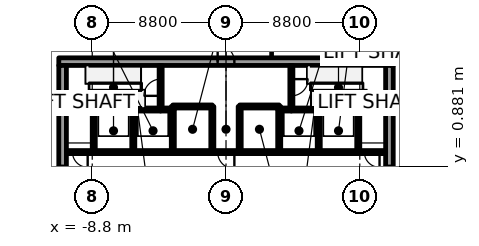
"""IFC4 building model, lengths in metres.
Left out: names, types, materials, properties, quantities, classifications, styles, units other than length and angle.
Written with IfcOpenShell. Run it as: python <this file> out.ifc"""

import sys

from ifc_helpers import new_model, si_unit, direction, frame, frame_2d, origin, place, context, subcontext, project, spatial, rectangle, extrude, element, fill, save


model = new_model("IFC4")
c1 = context("Model", 3, precision=1e-05, world=origin(), true_north=direction((0.0, 1.0)))
c2 = subcontext(c1, "Body", "Model", "MODEL_VIEW")
j1 = project(units=[si_unit("LENGTHUNIT", "METRE"), si_unit("PLANEANGLEUNIT", "RADIAN")], contexts=[c1])
p1 = place(None, origin())
s1 = spatial("IfcSite", under=j1, at=p1, CompositionType="ELEMENT")
p2 = place(p1, origin())
s2 = spatial("IfcBuilding", under=s1, at=p2, CompositionType="ELEMENT")
p3 = place(p2, origin())
s3 = spatial("IfcBuildingStorey", under=s2, at=p3, CompositionType="ELEMENT", Elevation=0.0)
p4 = place(p3, frame((-11.0, 7.75, 0.0), z_axis=(0.0, 0.0, 1.0), x_axis=(1.0, 0.0, 0.0)))
e1 = element("IfcWall", 1, at=p4, inside=s3, PredefinedType="SHEAR", context=c2, shape_type="SweptSolid", body=[
    extrude(rectangle(XDim=22.0, YDim=0.5, at=frame_2d((11.0, 0.0))), origin(), (0.0, 0.0, 1.0), 9.0),
])
p5 = place(p4, frame((10.45, 0.0, 0.0)))
e2 = element("IfcOpeningElement", 2, at=p5, cuts=e1, PredefinedType="OPENING", context=c2, shape_type="SweptSolid", body=[
    extrude(rectangle(XDim=1.1, YDim=2.1, at=frame_2d((0.55, 1.05))), frame((0.0, 0.25, 0.0), z_axis=(0.0, -1.0, 0.0), x_axis=(1.0, 0.0, 0.0)), (0.0, 0.0, 1.0), 0.5),
])
p6 = place(p3, frame((-10.75, -7.5, 0.0), z_axis=(0.0, 0.0, 1.0), x_axis=(0.0, 1.0, 0.0)))
e3 = element("IfcWall", 3, at=p6, inside=s3, PredefinedType="SHEAR", context=c2, shape_type="SweptSolid", body=[
    extrude(rectangle(XDim=15.0, YDim=0.5, at=frame_2d((7.5, 0.0))), origin(), (0.0, 0.0, 1.0), 9.0),
])
p7 = place(p6, frame((6.6, 0.0, 0.0)))
e4 = element("IfcOpeningElement", 4, at=p7, cuts=e3, PredefinedType="OPENING", context=c2, shape_type="SweptSolid", body=[
    extrude(rectangle(XDim=1.8, YDim=2.1, at=frame_2d((0.9, 1.05))), frame((0.0, 0.25, 0.0), z_axis=(0.0, -1.0, 0.0), x_axis=(1.0, 0.0, 0.0)), (0.0, 0.0, 1.0), 0.5),
])
p8 = place(p3, frame((10.75, -7.5, 0.0), z_axis=(0.0, 0.0, 1.0), x_axis=(0.0, 1.0, 0.0)))
e5 = element("IfcWall", 5, at=p8, inside=s3, PredefinedType="SHEAR", context=c2, shape_type="SweptSolid", body=[
    extrude(rectangle(XDim=15.0, YDim=0.5, at=frame_2d((7.5, 0.0))), origin(), (0.0, 0.0, 1.0), 9.0),
])
p9 = place(p8, frame((6.6, 0.0, 0.0)))
e6 = element("IfcOpeningElement", 6, at=p9, cuts=e5, PredefinedType="OPENING", context=c2, shape_type="SweptSolid", body=[
    extrude(rectangle(XDim=1.8, YDim=2.1, at=frame_2d((0.9, 1.05))), frame((0.0, 0.25, 0.0), z_axis=(0.0, -1.0, 0.0), x_axis=(1.0, 0.0, 0.0)), (0.0, 0.0, 1.0), 0.5),
])
p10 = place(p3, frame((-8.7, 1.8, 0.0), z_axis=(0.0, 0.0, 1.0), x_axis=(-1.0, 0.0, 0.0)))
e7 = element("IfcWall", 7, at=p10, inside=s3, PredefinedType="SOLIDWALL", context=c2, shape_type="SweptSolid", body=[
    extrude(rectangle(XDim=1.8, YDim=0.2, at=frame_2d((0.9, 0.0))), origin(), (0.0, 0.0, 1.0), 8.75),
])
p11 = place(p10, frame((0.4, 0.0, 0.0)))
e8 = element("IfcOpeningElement", 8, at=p11, cuts=e7, PredefinedType="OPENING", context=c2, shape_type="SweptSolid", body=[
    extrude(rectangle(XDim=1.0, YDim=2.4, at=frame_2d((0.5, 1.2))), frame((0.0, 0.1, 0.0), z_axis=(0.0, -1.0, 0.0), x_axis=(1.0, 0.0, 0.0)), (0.0, 0.0, 1.0), 0.2),
])
p12 = place(p3, frame((-8.7, 4.6, 0.0), z_axis=(0.0, 0.0, 1.0), x_axis=(-1.0, 0.0, 0.0)))
e9 = element("IfcWall", 9, at=p12, inside=s3, PredefinedType="SOLIDWALL", context=c2, shape_type="SweptSolid", body=[
    extrude(rectangle(XDim=1.8, YDim=0.2, at=frame_2d((0.9, 0.0))), origin(), (0.0, 0.0, 1.0), 8.75),
])
p13 = place(p3, frame((-6.1, 1.8, 0.0), z_axis=(0.0, 0.0, 1.0), x_axis=(-1.0, 0.0, 0.0)))
e10 = element("IfcWall", 10, at=p13, inside=s3, PredefinedType="SOLIDWALL", context=c2, shape_type="SweptSolid", body=[
    extrude(rectangle(XDim=2.6, YDim=0.2, at=frame_2d((1.3, 0.0))), origin(), (0.0, 0.0, 1.0), 8.75),
])
p14 = place(p13, frame((0.75, 0.0, 0.0)))
e11 = element("IfcOpeningElement", 11, at=p14, cuts=e10, PredefinedType="OPENING", context=c2, shape_type="SweptSolid", body=[
    extrude(rectangle(XDim=1.1, YDim=2.1, at=frame_2d((0.55, 1.05))), frame((0.0, 0.1, 0.0), z_axis=(0.0, -1.0, 0.0), x_axis=(1.0, 0.0, 0.0)), (0.0, 0.0, 1.0), 0.2),
])
p15 = place(p3, frame((-8.7, 1.8, 0.0), z_axis=(0.0, 0.0, 1.0), x_axis=(0.0, 1.0, 0.0)))
e12 = element("IfcWall", 12, at=p15, inside=s3, PredefinedType="SOLIDWALL", context=c2, shape_type="SweptSolid", body=[
    extrude(rectangle(XDim=2.8, YDim=0.2, at=frame_2d((1.4, 0.0))), origin(), (0.0, 0.0, 1.0), 8.75),
])
p16 = place(p3, frame((-6.1, 4.6, 0.0), z_axis=(0.0, 0.0, 1.0), x_axis=(-1.0, 0.0, 0.0)))
e13 = element("IfcWall", 13, at=p16, inside=s3, PredefinedType="SOLIDWALL", context=c2, shape_type="SweptSolid", body=[
    extrude(rectangle(XDim=2.6, YDim=0.2, at=frame_2d((1.3, 0.0))), origin(), (0.0, 0.0, 1.0), 8.75),
])
p17 = place(p3, frame((-3.5, 1.8, 0.0), z_axis=(0.0, 0.0, 1.0), x_axis=(-1.0, 0.0, 0.0)))
e14 = element("IfcWall", 14, at=p17, inside=s3, PredefinedType="SOLIDWALL", context=c2, shape_type="SweptSolid", body=[
    extrude(rectangle(XDim=2.6, YDim=0.2, at=frame_2d((1.3, 0.0))), origin(), (0.0, 0.0, 1.0), 8.75),
])
p18 = place(p17, frame((0.75, 0.0, 0.0)))
e15 = element("IfcOpeningElement", 15, at=p18, cuts=e14, PredefinedType="OPENING", context=c2, shape_type="SweptSolid", body=[
    extrude(rectangle(XDim=1.1, YDim=2.1, at=frame_2d((0.55, 1.05))), frame((0.0, 0.1, 0.0), z_axis=(0.0, -1.0, 0.0), x_axis=(1.0, 0.0, 0.0)), (0.0, 0.0, 1.0), 0.2),
])
p19 = place(p3, frame((-6.1, 1.8, 0.0), z_axis=(0.0, 0.0, 1.0), x_axis=(0.0, 1.0, 0.0)))
e16 = element("IfcWall", 16, at=p19, inside=s3, PredefinedType="SOLIDWALL", context=c2, shape_type="SweptSolid", body=[
    extrude(rectangle(XDim=2.8, YDim=0.2, at=frame_2d((1.4, 0.0))), origin(), (0.0, 0.0, 1.0), 8.75),
])
p20 = place(p3, frame((-4.3, 4.6, 0.0), z_axis=(0.0, 0.0, 1.0), x_axis=(-1.0, 0.0, 0.0)))
e17 = element("IfcWall", 17, at=p20, inside=s3, PredefinedType="SOLIDWALL", context=c2, shape_type="SweptSolid", body=[
    extrude(rectangle(XDim=1.8, YDim=0.2, at=frame_2d((0.9, 0.0))), origin(), (0.0, 0.0, 1.0), 8.75),
])
p21 = place(p3, frame((-3.5, 4.6, 0.0), z_axis=(0.0, 0.0, 1.0), x_axis=(-1.0, 0.0, 0.0)))
e18 = element("IfcWall", 18, at=p21, inside=s3, PredefinedType="SOLIDWALL", context=c2, shape_type="SweptSolid", body=[
    extrude(rectangle(XDim=0.8, YDim=0.2, at=frame_2d((0.4, 0.0))), origin(), (0.0, 0.0, 1.0), 8.75),
])
p22 = place(p3, frame((-4.3, 4.6, 0.0), z_axis=(0.0, 0.0, 1.0), x_axis=(0.0, 1.0, 0.0)))
e19 = element("IfcWall", 19, at=p22, inside=s3, PredefinedType="SOLIDWALL", context=c2, shape_type="SweptSolid", body=[
    extrude(rectangle(XDim=2.9, YDim=0.2, at=frame_2d((1.45, 0.0))), origin(), (0.0, 0.0, 1.0), 8.75),
])
p23 = place(p22, frame((0.9, 0.0, 0.0)))
e20 = element("IfcOpeningElement", 20, at=p23, cuts=e19, PredefinedType="OPENING", context=c2, shape_type="SweptSolid", body=[
    extrude(rectangle(XDim=1.1, YDim=2.4, at=frame_2d((0.55, 1.2))), frame((0.0, 0.1, 0.0), z_axis=(0.0, -1.0, 0.0), x_axis=(1.0, 0.0, 0.0)), (0.0, 0.0, 1.0), 0.2),
])
p24 = place(p3, frame((-0.9, 1.8, 0.0), z_axis=(0.0, 0.0, 1.0), x_axis=(-1.0, 0.0, 0.0)))
e21 = element("IfcWall", 21, at=p24, inside=s3, PredefinedType="SOLIDWALL", context=c2, shape_type="SweptSolid", body=[
    extrude(rectangle(XDim=2.6, YDim=0.2, at=frame_2d((1.3, 0.0))), origin(), (0.0, 0.0, 1.0), 8.75),
])
p25 = place(p3, frame((-3.5, 4.6, 0.0), z_axis=(0.0, 0.0, 1.0), x_axis=(0.0, -1.0, 0.0)))
e22 = element("IfcWall", 22, at=p25, inside=s3, PredefinedType="SOLIDWALL", context=c2, shape_type="SweptSolid", body=[
    extrude(rectangle(XDim=2.8, YDim=0.2, at=frame_2d((1.4, 0.0))), origin(), (0.0, 0.0, 1.0), 8.75),
])
p26 = place(p3, frame((-0.9, 1.8, 0.0), z_axis=(0.0, 0.0, 1.0), x_axis=(0.0, 1.0, 0.0)))
e23 = element("IfcWall", 23, at=p26, inside=s3, PredefinedType="SOLIDWALL", context=c2, shape_type="SweptSolid", body=[
    extrude(rectangle(XDim=3.0, YDim=0.2, at=frame_2d((1.5, 0.0))), origin(), (0.0, 0.0, 1.0), 8.75),
])
p27 = place(p26, frame((0.9, 0.0, 0.0)))
e24 = element("IfcOpeningElement", 24, at=p27, cuts=e23, PredefinedType="OPENING", context=c2, shape_type="SweptSolid", body=[
    extrude(rectangle(XDim=1.2, YDim=2.1, at=frame_2d((0.6, 1.05))), frame((0.0, 0.1, 0.0), z_axis=(0.0, -1.0, 0.0), x_axis=(1.0, 0.0, 0.0)), (0.0, 0.0, 1.0), 0.2),
])
p28 = place(p3, frame((-0.9, 4.8, 0.0), z_axis=(0.0, 0.0, 1.0), x_axis=(-1.0, 0.0, 0.0)))
e25 = element("IfcWall", 25, at=p28, inside=s3, PredefinedType="SOLIDWALL", context=c2, shape_type="SweptSolid", body=[
    extrude(rectangle(XDim=2.6, YDim=0.2, at=frame_2d((1.3, 0.0))), origin(), (0.0, 0.0, 1.0), 8.75),
])
p29 = place(p3, frame((-3.5, 4.8, 0.0), z_axis=(0.0, 0.0, 1.0), x_axis=(0.0, -1.0, 0.0)))
e26 = element("IfcWall", 26, at=p29, inside=s3, PredefinedType="SOLIDWALL", context=c2, shape_type="SweptSolid", body=[
    extrude(rectangle(XDim=0.2, YDim=0.2, at=frame_2d((0.1, 0.0))), origin(), (0.0, 0.0, 1.0), 8.75),
])
p30 = place(p3, frame((0.9, 1.8, 0.0), z_axis=(0.0, 0.0, 1.0), x_axis=(-1.0, 0.0, 0.0)))
e27 = element("IfcWall", 27, at=p30, inside=s3, PredefinedType="SOLIDWALL", context=c2, shape_type="SweptSolid", body=[
    extrude(rectangle(XDim=1.8, YDim=0.2, at=frame_2d((0.9, 0.0))), origin(), (0.0, 0.0, 1.0), 8.75),
])
p31 = place(p30, frame((0.35, 0.0, 0.0)))
e28 = element("IfcOpeningElement", 28, at=p31, cuts=e27, PredefinedType="OPENING", context=c2, shape_type="SweptSolid", body=[
    extrude(rectangle(XDim=1.1, YDim=2.4, at=frame_2d((0.55, 1.2))), frame((0.0, 0.1, 0.0), z_axis=(0.0, -1.0, 0.0), x_axis=(1.0, 0.0, 0.0)), (0.0, 0.0, 1.0), 0.2),
])
p32 = place(p3, frame((3.5, 1.8, 0.0), z_axis=(0.0, 0.0, 1.0), x_axis=(-1.0, 0.0, 0.0)))
e29 = element("IfcWall", 29, at=p32, inside=s3, PredefinedType="SOLIDWALL", context=c2, shape_type="SweptSolid", body=[
    extrude(rectangle(XDim=2.6, YDim=0.2, at=frame_2d((1.3, 0.0))), origin(), (0.0, 0.0, 1.0), 8.75),
])
p33 = place(p3, frame((3.5, 4.6, 0.0), z_axis=(0.0, 0.0, 1.0), x_axis=(0.0, 1.0, 0.0)))
e30 = element("IfcWall", 30, at=p33, inside=s3, PredefinedType="SOLIDWALL", context=c2, shape_type="SweptSolid", body=[
    extrude(rectangle(XDim=0.2, YDim=0.2, at=frame_2d((0.1, 0.0))), origin(), (0.0, 0.0, 1.0), 8.75),
])
p34 = place(p3, frame((3.5, 4.8, 0.0), z_axis=(0.0, 0.0, 1.0), x_axis=(-1.0, 0.0, 0.0)))
e31 = element("IfcWall", 31, at=p34, inside=s3, PredefinedType="SOLIDWALL", context=c2, shape_type="SweptSolid", body=[
    extrude(rectangle(XDim=2.6, YDim=0.2, at=frame_2d((1.3, 0.0))), origin(), (0.0, 0.0, 1.0), 8.75),
])
p35 = place(p3, frame((0.9, 4.8, 0.0), z_axis=(0.0, 0.0, 1.0), x_axis=(0.0, -1.0, 0.0)))
e32 = element("IfcWall", 32, at=p35, inside=s3, PredefinedType="SOLIDWALL", context=c2, shape_type="SweptSolid", body=[
    extrude(rectangle(XDim=3.0, YDim=0.2, at=frame_2d((1.5, 0.0))), origin(), (0.0, 0.0, 1.0), 8.75),
])
p36 = place(p35, frame((0.9, 0.0, 0.0)))
e33 = element("IfcOpeningElement", 33, at=p36, cuts=e32, PredefinedType="OPENING", context=c2, shape_type="SweptSolid", body=[
    extrude(rectangle(XDim=1.2, YDim=2.1, at=frame_2d((0.6, 1.05))), frame((0.0, 0.1, 0.0), z_axis=(0.0, -1.0, 0.0), x_axis=(1.0, 0.0, 0.0)), (0.0, 0.0, 1.0), 0.2),
])
p37 = place(p3, frame((6.1, 1.8, 0.0), z_axis=(0.0, 0.0, 1.0), x_axis=(-1.0, 0.0, 0.0)))
e34 = element("IfcWall", 34, at=p37, inside=s3, PredefinedType="SOLIDWALL", context=c2, shape_type="SweptSolid", body=[
    extrude(rectangle(XDim=2.6, YDim=0.2, at=frame_2d((1.3, 0.0))), origin(), (0.0, 0.0, 1.0), 8.75),
])
p38 = place(p37, frame((0.75, 0.0, 0.0)))
e35 = element("IfcOpeningElement", 35, at=p38, cuts=e34, PredefinedType="OPENING", context=c2, shape_type="SweptSolid", body=[
    extrude(rectangle(XDim=1.1, YDim=2.1, at=frame_2d((0.55, 1.05))), frame((0.0, 0.1, 0.0), z_axis=(0.0, -1.0, 0.0), x_axis=(1.0, 0.0, 0.0)), (0.0, 0.0, 1.0), 0.2),
])
p39 = place(p3, frame((3.5, 1.8, 0.0), z_axis=(0.0, 0.0, 1.0), x_axis=(0.0, 1.0, 0.0)))
e36 = element("IfcWall", 36, at=p39, inside=s3, PredefinedType="SOLIDWALL", context=c2, shape_type="SweptSolid", body=[
    extrude(rectangle(XDim=2.8, YDim=0.2, at=frame_2d((1.4, 0.0))), origin(), (0.0, 0.0, 1.0), 8.75),
])
p40 = place(p3, frame((4.3, 4.6, 0.0), z_axis=(0.0, 0.0, 1.0), x_axis=(-1.0, 0.0, 0.0)))
e37 = element("IfcWall", 37, at=p40, inside=s3, PredefinedType="SOLIDWALL", context=c2, shape_type="SweptSolid", body=[
    extrude(rectangle(XDim=0.8, YDim=0.2, at=frame_2d((0.4, 0.0))), origin(), (0.0, 0.0, 1.0), 8.75),
])
p41 = place(p3, frame((6.1, 4.6, 0.0), z_axis=(0.0, 0.0, 1.0), x_axis=(-1.0, 0.0, 0.0)))
e38 = element("IfcWall", 38, at=p41, inside=s3, PredefinedType="SOLIDWALL", context=c2, shape_type="SweptSolid", body=[
    extrude(rectangle(XDim=1.8, YDim=0.2, at=frame_2d((0.9, 0.0))), origin(), (0.0, 0.0, 1.0), 8.75),
])
p42 = place(p3, frame((4.3, 7.5, 0.0), z_axis=(0.0, 0.0, 1.0), x_axis=(0.0, -1.0, 0.0)))
e39 = element("IfcWall", 39, at=p42, inside=s3, PredefinedType="SOLIDWALL", context=c2, shape_type="SweptSolid", body=[
    extrude(rectangle(XDim=2.9, YDim=0.2, at=frame_2d((1.45, 0.0))), origin(), (0.0, 0.0, 1.0), 8.75),
])
p43 = place(p42, frame((0.9, 0.0, 0.0)))
e40 = element("IfcOpeningElement", 40, at=p43, cuts=e39, PredefinedType="OPENING", context=c2, shape_type="SweptSolid", body=[
    extrude(rectangle(XDim=1.1, YDim=2.4, at=frame_2d((0.55, 1.2))), frame((0.0, 0.1, 0.0), z_axis=(0.0, -1.0, 0.0), x_axis=(1.0, 0.0, 0.0)), (0.0, 0.0, 1.0), 0.2),
])
p44 = place(p3, frame((8.7, 1.8, 0.0), z_axis=(0.0, 0.0, 1.0), x_axis=(-1.0, 0.0, 0.0)))
e41 = element("IfcWall", 41, at=p44, inside=s3, PredefinedType="SOLIDWALL", context=c2, shape_type="SweptSolid", body=[
    extrude(rectangle(XDim=2.6, YDim=0.2, at=frame_2d((1.3, 0.0))), origin(), (0.0, 0.0, 1.0), 8.75),
])
p45 = place(p44, frame((0.75, 0.0, 0.0)))
e42 = element("IfcOpeningElement", 42, at=p45, cuts=e41, PredefinedType="OPENING", context=c2, shape_type="SweptSolid", body=[
    extrude(rectangle(XDim=1.1, YDim=2.1, at=frame_2d((0.55, 1.05))), frame((0.0, 0.1, 0.0), z_axis=(0.0, -1.0, 0.0), x_axis=(1.0, 0.0, 0.0)), (0.0, 0.0, 1.0), 0.2),
])
p46 = place(p3, frame((6.1, 1.8, 0.0), z_axis=(0.0, 0.0, 1.0), x_axis=(0.0, 1.0, 0.0)))
e43 = element("IfcWall", 43, at=p46, inside=s3, PredefinedType="SOLIDWALL", context=c2, shape_type="SweptSolid", body=[
    extrude(rectangle(XDim=2.8, YDim=0.2, at=frame_2d((1.4, 0.0))), origin(), (0.0, 0.0, 1.0), 8.75),
])
p47 = place(p3, frame((8.7, 4.6, 0.0), z_axis=(0.0, 0.0, 1.0), x_axis=(-1.0, 0.0, 0.0)))
e44 = element("IfcWall", 44, at=p47, inside=s3, PredefinedType="SOLIDWALL", context=c2, shape_type="SweptSolid", body=[
    extrude(rectangle(XDim=2.6, YDim=0.2, at=frame_2d((1.3, 0.0))), origin(), (0.0, 0.0, 1.0), 8.75),
])
p48 = place(p3, frame((10.5, 1.8, 0.0), z_axis=(0.0, 0.0, 1.0), x_axis=(-1.0, 0.0, 0.0)))
e45 = element("IfcWall", 45, at=p48, inside=s3, PredefinedType="SOLIDWALL", context=c2, shape_type="SweptSolid", body=[
    extrude(rectangle(XDim=1.8, YDim=0.2, at=frame_2d((0.9, 0.0))), origin(), (0.0, 0.0, 1.0), 8.75),
])
p49 = place(p48, frame((0.4, 0.0, 0.0)))
e46 = element("IfcOpeningElement", 46, at=p49, cuts=e45, PredefinedType="OPENING", context=c2, shape_type="SweptSolid", body=[
    extrude(rectangle(XDim=1.0, YDim=2.4, at=frame_2d((0.5, 1.2))), frame((0.0, 0.1, 0.0), z_axis=(0.0, -1.0, 0.0), x_axis=(1.0, 0.0, 0.0)), (0.0, 0.0, 1.0), 0.2),
])
p50 = place(p3, frame((8.7, 4.6, 0.0), z_axis=(0.0, 0.0, 1.0), x_axis=(0.0, -1.0, 0.0)))
e47 = element("IfcWall", 47, at=p50, inside=s3, PredefinedType="SOLIDWALL", context=c2, shape_type="SweptSolid", body=[
    extrude(rectangle(XDim=2.8, YDim=0.2, at=frame_2d((1.4, 0.0))), origin(), (0.0, 0.0, 1.0), 8.75),
])
p51 = place(p3, frame((10.5, 4.6, 0.0), z_axis=(0.0, 0.0, 1.0), x_axis=(-1.0, 0.0, 0.0)))
e48 = element("IfcWall", 48, at=p51, inside=s3, PredefinedType="SOLIDWALL", context=c2, shape_type="SweptSolid", body=[
    extrude(rectangle(XDim=1.8, YDim=0.2, at=frame_2d((0.9, 0.0))), origin(), (0.0, 0.0, 1.0), 8.75),
])
p52 = place(p3, frame((2.999, 8.0, 0.0), z_axis=(0.0, 0.0, 1.0), x_axis=(0.0, 1.0, 0.0)))
e49 = element("IfcWall", 49, at=p52, inside=s3, PredefinedType="PARTITIONING", context=c2, shape_type="SweptSolid", body=[
    extrude(rectangle(XDim=6.0, YDim=0.15, at=frame_2d((3.0, 0.0))), origin(), (0.0, 0.0, 1.0), 7.94),
])
p53 = place(p14, origin())
e50 = element("IfcDoor", 50, at=p53, inside=s3, OperationType="SLIDING_TO_LEFT", PredefinedType="DOOR", context=c2, shape_type="SweptSolid", body=[
    extrude(rectangle(XDim=1.1, YDim=2.1, at=frame_2d((0.55, 1.05))), frame((0.0, 0.025, 0.0), z_axis=(0.0, -1.0, 0.0), x_axis=(1.0, 0.0, 0.0)), (0.0, 0.0, 1.0), 0.05),
])
fill(e11, e50)
p54 = place(p18, origin())
e51 = element("IfcDoor", 51, at=p54, inside=s3, OperationType="SLIDING_TO_RIGHT", PredefinedType="DOOR", context=c2, shape_type="SweptSolid", body=[
    extrude(rectangle(XDim=1.1, YDim=2.1, at=frame_2d((0.55, 1.05))), frame((0.0, 0.025, 0.0), z_axis=(0.0, -1.0, 0.0), x_axis=(1.0, 0.0, 0.0)), (0.0, 0.0, 1.0), 0.05),
])
fill(e15, e51)
p55 = place(p38, origin())
e52 = element("IfcDoor", 52, at=p55, inside=s3, OperationType="SLIDING_TO_LEFT", PredefinedType="DOOR", context=c2, shape_type="SweptSolid", body=[
    extrude(rectangle(XDim=1.1, YDim=2.1, at=frame_2d((0.55, 1.05))), frame((0.0, 0.025, 0.0), z_axis=(0.0, -1.0, 0.0), x_axis=(1.0, 0.0, 0.0)), (0.0, 0.0, 1.0), 0.05),
])
fill(e35, e52)
p56 = place(p45, origin())
e53 = element("IfcDoor", 53, at=p56, inside=s3, OperationType="SLIDING_TO_RIGHT", PredefinedType="DOOR", context=c2, shape_type="SweptSolid", body=[
    extrude(rectangle(XDim=1.1, YDim=2.1, at=frame_2d((0.55, 1.05))), frame((0.0, 0.025, 0.0), z_axis=(0.0, -1.0, 0.0), x_axis=(1.0, 0.0, 0.0)), (0.0, 0.0, 1.0), 0.05),
])
fill(e42, e53)
p57 = place(p27, origin())
e54 = element("IfcDoor", 54, at=p57, inside=s3, OperationType="SLIDING_TO_RIGHT", PredefinedType="DOOR", context=c2, shape_type="SweptSolid", body=[
    extrude(rectangle(XDim=1.2, YDim=2.1, at=frame_2d((0.6, 1.05))), frame((0.0, 0.025, 0.0), z_axis=(0.0, -1.0, 0.0), x_axis=(1.0, 0.0, 0.0)), (0.0, 0.0, 1.0), 0.05),
])
fill(e24, e54)
p58 = place(p36, origin())
e55 = element("IfcDoor", 55, at=p58, inside=s3, OperationType="SLIDING_TO_RIGHT", PredefinedType="DOOR", context=c2, shape_type="SweptSolid", body=[
    extrude(rectangle(XDim=1.2, YDim=2.1, at=frame_2d((0.6, 1.05))), frame((0.0, 0.025, 0.0), z_axis=(0.0, -1.0, 0.0), x_axis=(1.0, 0.0, 0.0)), (0.0, 0.0, 1.0), 0.05),
])
fill(e33, e55)
p59 = place(p31, origin())
e56 = element("IfcDoor", 56, at=p59, inside=s3, OperationType="SINGLE_SWING_RIGHT", PredefinedType="DOOR", context=c2, shape_type="SweptSolid", body=[
    extrude(rectangle(XDim=1.1, YDim=2.4, at=frame_2d((0.55, 1.2))), frame((0.0, 0.025, 0.0), z_axis=(0.0, -1.0, 0.0), x_axis=(1.0, 0.0, 0.0)), (0.0, 0.0, 1.0), 0.05),
])
fill(e28, e56)
p60 = place(p11, origin())
e57 = element("IfcDoor", 57, at=p60, inside=s3, OperationType="SINGLE_SWING_LEFT", PredefinedType="DOOR", context=c2, shape_type="SweptSolid", body=[
    extrude(rectangle(XDim=1.0, YDim=2.4, at=frame_2d((0.5, 1.2))), frame((0.0, 0.025, 0.0), z_axis=(0.0, -1.0, 0.0), x_axis=(1.0, 0.0, 0.0)), (0.0, 0.0, 1.0), 0.05),
])
fill(e8, e57)
p61 = place(p49, origin())
e58 = element("IfcDoor", 58, at=p61, inside=s3, OperationType="SINGLE_SWING_RIGHT", PredefinedType="DOOR", context=c2, shape_type="SweptSolid", body=[
    extrude(rectangle(XDim=1.0, YDim=2.4, at=frame_2d((0.5, 1.2))), frame((0.0, 0.025, 0.0), z_axis=(0.0, -1.0, 0.0), x_axis=(1.0, 0.0, 0.0)), (0.0, 0.0, 1.0), 0.05),
])
fill(e46, e58)
p62 = place(p23, origin())
e59 = element("IfcDoor", 59, at=p62, inside=s3, OperationType="SINGLE_SWING_LEFT", PredefinedType="DOOR", context=c2, shape_type="SweptSolid", body=[
    extrude(rectangle(XDim=1.1, YDim=2.4, at=frame_2d((0.55, 1.2))), frame((0.0, 0.025, 0.0), z_axis=(0.0, -1.0, 0.0), x_axis=(1.0, 0.0, 0.0)), (0.0, 0.0, 1.0), 0.05),
])
fill(e20, e59)
p63 = place(p43, origin())
e60 = element("IfcDoor", 60, at=p63, inside=s3, OperationType="SINGLE_SWING_RIGHT", PredefinedType="DOOR", context=c2, shape_type="SweptSolid", body=[
    extrude(rectangle(XDim=1.1, YDim=2.4, at=frame_2d((0.55, 1.2))), frame((0.0, 0.025, 0.0), z_axis=(0.0, -1.0, 0.0), x_axis=(1.0, 0.0, 0.0)), (0.0, 0.0, 1.0), 0.05),
])
fill(e40, e60)
p64 = place(p7, origin())
e61 = element("IfcDoor", 61, at=p64, inside=s3, OperationType="DOUBLE_DOOR_SINGLE_SWING", PredefinedType="DOOR", context=c2, shape_type="SweptSolid", body=[
    extrude(rectangle(XDim=1.8, YDim=2.1, at=frame_2d((0.9, 1.05))), frame((0.0, 0.025, 0.0), z_axis=(0.0, -1.0, 0.0), x_axis=(1.0, 0.0, 0.0)), (0.0, 0.0, 1.0), 0.05),
])
fill(e4, e61)
p65 = place(p9, origin())
e62 = element("IfcDoor", 62, at=p65, inside=s3, OperationType="DOUBLE_DOOR_SINGLE_SWING", PredefinedType="DOOR", context=c2, shape_type="SweptSolid", body=[
    extrude(rectangle(XDim=1.8, YDim=2.1, at=frame_2d((0.9, 1.05))), frame((0.0, 0.025, 0.0), z_axis=(0.0, -1.0, 0.0), x_axis=(1.0, 0.0, 0.0)), (0.0, 0.0, 1.0), 0.05),
])
fill(e6, e62)
p66 = place(p5, origin())
e63 = element("IfcDoor", 63, at=p66, inside=s3, OperationType="SINGLE_SWING_RIGHT", PredefinedType="DOOR", context=c2, shape_type="SweptSolid", body=[
    extrude(rectangle(XDim=1.1, YDim=2.1, at=frame_2d((0.55, 1.05))), frame((0.0, 0.025, 0.0), z_axis=(0.0, -1.0, 0.0), x_axis=(1.0, 0.0, 0.0)), (0.0, 0.0, 1.0), 0.05),
])
fill(e2, e63)
save(model, sys.argv[1])
